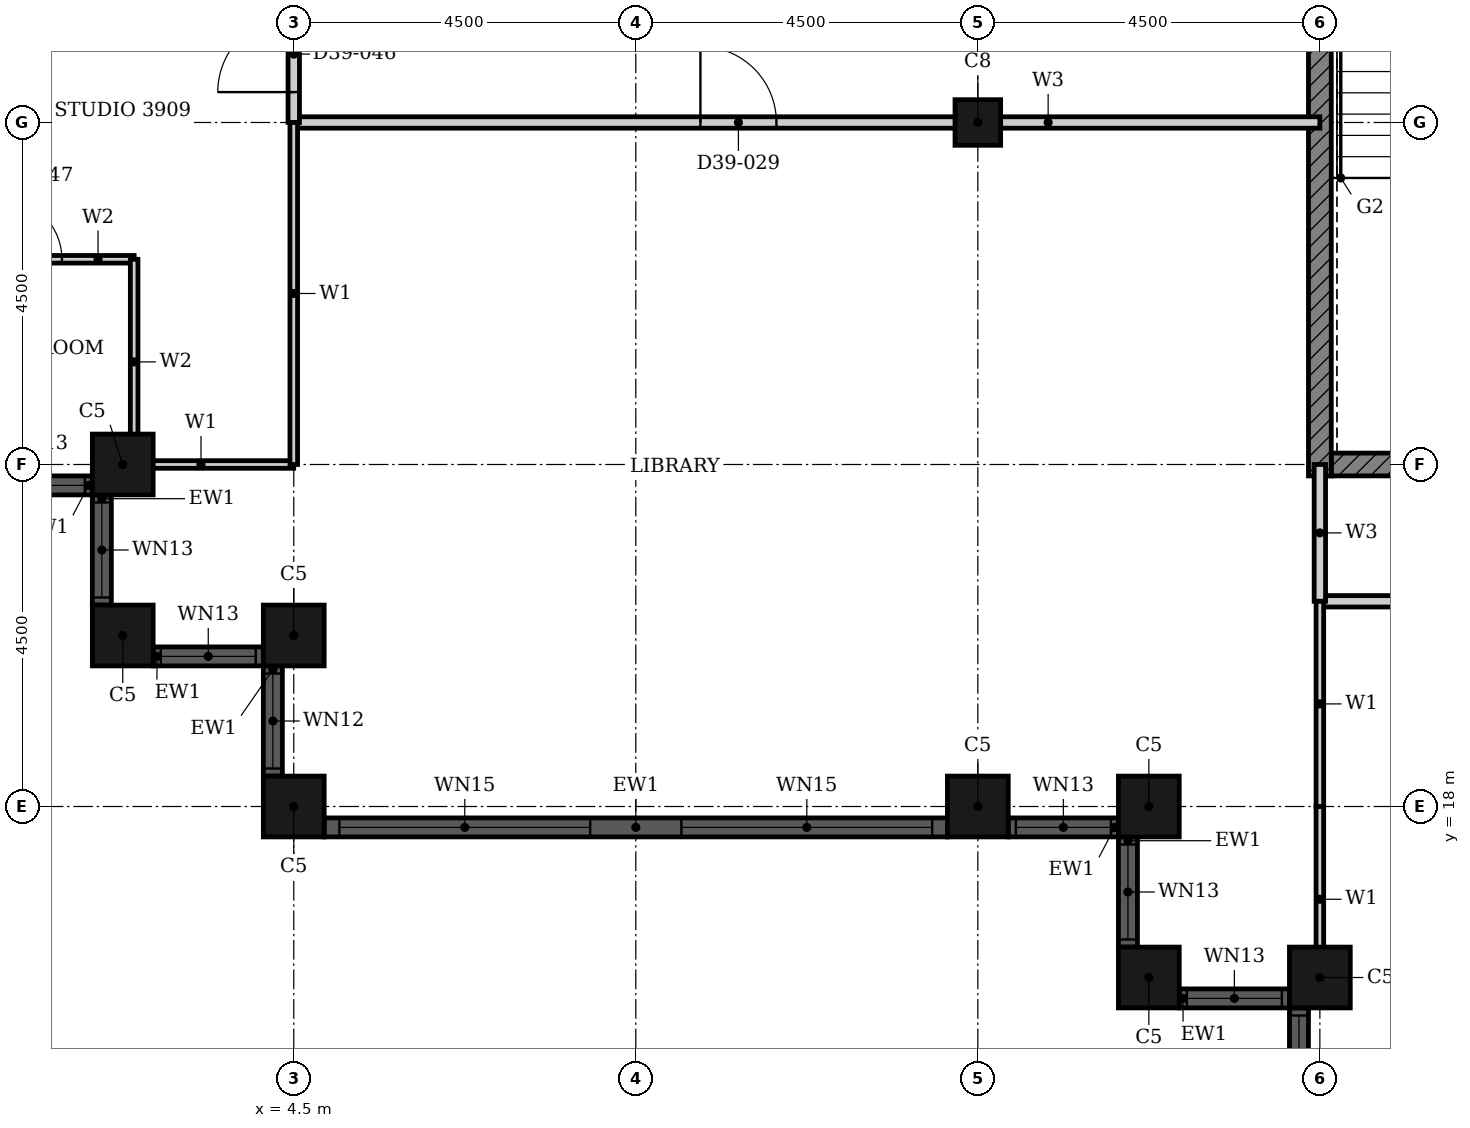
"""IFC4 building model, lengths in metres.
Left out: names, types, materials, properties, quantities, classifications, styles, units other than length and angle.
Written with IfcOpenShell. Run it as: python <this file> out.ifc"""

import sys

from ifc_helpers import new_model, si_unit, direction, frame, frame_2d, origin, origin_2d, place, context, subcontext, project, spatial, rectangle, hollow_rectangle, extrude, element, fill, save


model = new_model("IFC4")
c1 = context("Model", 3, precision=1e-05, world=origin(), true_north=direction((0.0, 1.0)))
c2 = subcontext(c1, "Body", "Model", "MODEL_VIEW")
j1 = project(units=[si_unit("LENGTHUNIT", "METRE"), si_unit("PLANEANGLEUNIT", "RADIAN")], contexts=[c1])
p1 = place(None, origin())
s1 = spatial("IfcSite", under=j1, at=p1, CompositionType="ELEMENT")
p2 = place(p1, origin())
s2 = spatial("IfcBuilding", under=s1, at=p2, CompositionType="ELEMENT")
p3 = place(p2, frame((0.0, 0.0, 158.0)))
s3 = spatial("IfcBuildingStorey", under=s2, at=p3, CompositionType="ELEMENT", Elevation=158.0)
for number, where, z_axis, x_axis in (
    (1, (2.25, 22.5, 0.0), (0.0, 0.0, 1.0), (1.0, 0.0, 0.0)),
    (2, (2.25, 20.25, 0.0), (0.0, 0.0, 1.0), (1.0, 0.0, 0.0)),
    (3, (4.5, 20.25, 0.0), (0.0, 0.0, 1.0), (1.0, 0.0, 0.0)),
    (4, (4.5, 18.0, 0.0), (0.0, 0.0, 1.0), (1.0, 0.0, 0.0)),
    (5, (13.5, 18.0, 0.0), (0.0, 0.0, 1.0), (1.0, 0.0, 0.0)),
    (6, (15.75, 18.0, 0.0), (0.0, 0.0, 1.0), (1.0, 0.0, 0.0)),
    (7, (15.75, 15.75, 0.0), (0.0, 0.0, 1.0), (1.0, 0.0, 0.0)),
    (8, (18.0, 15.75, 0.0), (0.0, 0.0, 1.0), (1.0, 0.0, 0.0)),
):
    element("IfcColumn", number, at=place(p3, frame(where, z_axis=z_axis, x_axis=x_axis)), inside=s3, PredefinedType="COLUMN", context=c2, shape_type="SweptSolid", body=[
        extrude(hollow_rectangle(XDim=0.8, YDim=0.8, WallThickness=0.025, at=origin_2d()), origin(), (0.0, 0.0, 1.0), 3.7),
    ])
p4 = place(p3, frame((13.5, 27.0, 0.0), z_axis=(0.0, 0.0, 1.0), x_axis=(1.0, 0.0, 0.0)))
e9 = element("IfcColumn", 9, at=p4, inside=s3, PredefinedType="COLUMN", context=c2, shape_type="SweptSolid", body=[
    extrude(hollow_rectangle(XDim=0.6, YDim=0.6, WallThickness=0.02, at=origin_2d()), origin(), (0.0, 0.0, 1.0), 3.7),
])
p5 = place(p3, frame((0.4, 22.225, 0.0), z_axis=(0.0, 0.0, 1.0), x_axis=(1.0, 0.0, 0.0)))
e10 = element("IfcWall", 10, at=p5, inside=s3, PredefinedType="SOLIDWALL", context=c2, shape_type="SweptSolid", body=[
    extrude(rectangle(XDim=1.45, YDim=0.25, at=frame_2d((0.725, 0.0))), origin(), (0.0, 0.0, 1.0), 3.7),
])
p6 = place(p5, frame((0.1, 0.0, 0.9)))
e11 = element("IfcOpeningElement", 11, at=p6, cuts=e10, PredefinedType="OPENING", context=c2, shape_type="SweptSolid", body=[
    extrude(rectangle(XDim=1.25, YDim=1.85, at=frame_2d((0.625, 0.925))), frame((0.0, 0.135, 0.0), z_axis=(0.0, -1.0, 0.0), x_axis=(1.0, 0.0, 0.0)), (0.0, 0.0, 1.0), 0.27),
])
p7 = place(p3, frame((1.975, 22.1, 0.0), z_axis=(0.0, 0.0, 1.0), x_axis=(0.0, -1.0, 0.0)))
e12 = element("IfcWall", 12, at=p7, inside=s3, PredefinedType="SOLIDWALL", context=c2, shape_type="SweptSolid", body=[
    extrude(rectangle(XDim=1.45, YDim=0.25, at=frame_2d((0.725, 0.0))), origin(), (0.0, 0.0, 1.0), 3.7),
])
p8 = place(p7, frame((0.1, 0.0, 0.9)))
e13 = element("IfcOpeningElement", 13, at=p8, cuts=e12, PredefinedType="OPENING", context=c2, shape_type="SweptSolid", body=[
    extrude(rectangle(XDim=1.25, YDim=1.85, at=frame_2d((0.625, 0.925))), frame((0.0, 0.135, 0.0), z_axis=(0.0, -1.0, 0.0), x_axis=(1.0, 0.0, 0.0)), (0.0, 0.0, 1.0), 0.27),
])
p9 = place(p3, frame((2.65, 19.975, 0.0), z_axis=(0.0, 0.0, 1.0), x_axis=(1.0, 0.0, 0.0)))
e14 = element("IfcWall", 14, at=p9, inside=s3, PredefinedType="SOLIDWALL", context=c2, shape_type="SweptSolid", body=[
    extrude(rectangle(XDim=1.45, YDim=0.25, at=frame_2d((0.725, 0.0))), origin(), (0.0, 0.0, 1.0), 3.7),
])
p10 = place(p9, frame((0.1, 0.0, 0.9)))
e15 = element("IfcOpeningElement", 15, at=p10, cuts=e14, PredefinedType="OPENING", context=c2, shape_type="SweptSolid", body=[
    extrude(rectangle(XDim=1.25, YDim=1.85, at=frame_2d((0.625, 0.925))), frame((0.0, 0.135, 0.0), z_axis=(0.0, -1.0, 0.0), x_axis=(1.0, 0.0, 0.0)), (0.0, 0.0, 1.0), 0.27),
])
p11 = place(p3, frame((4.225, 19.85, 0.0), z_axis=(0.0, 0.0, 1.0), x_axis=(0.0, -1.0, 0.0)))
e16 = element("IfcWall", 16, at=p11, inside=s3, PredefinedType="SOLIDWALL", context=c2, shape_type="SweptSolid", body=[
    extrude(rectangle(XDim=1.45, YDim=0.25, at=frame_2d((0.725, 0.0))), origin(), (0.0, 0.0, 1.0), 3.7),
])
p12 = place(p11, frame((0.1, 0.0, 0.9)))
e17 = element("IfcOpeningElement", 17, at=p12, cuts=e16, PredefinedType="OPENING", context=c2, shape_type="SweptSolid", body=[
    extrude(rectangle(XDim=1.25, YDim=2.08, at=frame_2d((0.625, 1.04))), frame((0.0, 0.135, 0.0), z_axis=(0.0, -1.0, 0.0), x_axis=(1.0, 0.0, 0.0)), (0.0, 0.0, 1.0), 0.27),
])
p13 = place(p3, frame((4.9, 17.725, 0.0), z_axis=(0.0, 0.0, 1.0), x_axis=(1.0, 0.0, 0.0)))
e18 = element("IfcWall", 18, at=p13, inside=s3, PredefinedType="SOLIDWALL", context=c2, shape_type="SweptSolid", body=[
    extrude(rectangle(XDim=8.2, YDim=0.25, at=frame_2d((4.1, 0.0))), origin(), (0.0, 0.0, 1.0), 3.7),
])
p14 = place(p13, frame((0.2, 0.0, 0.45)))
e19 = element("IfcOpeningElement", 19, at=p14, cuts=e18, PredefinedType="OPENING", context=c2, shape_type="SweptSolid", body=[
    extrude(rectangle(XDim=3.3, YDim=2.3, at=frame_2d((1.65, 1.15))), frame((0.0, 0.135, 0.0), z_axis=(0.0, -1.0, 0.0), x_axis=(1.0, 0.0, 0.0)), (0.0, 0.0, 1.0), 0.27),
])
p15 = place(p13, frame((4.7, 0.0, 0.45)))
e20 = element("IfcOpeningElement", 20, at=p15, cuts=e18, PredefinedType="OPENING", context=c2, shape_type="SweptSolid", body=[
    extrude(rectangle(XDim=3.3, YDim=2.3, at=frame_2d((1.65, 1.15))), frame((0.0, 0.135, 0.0), z_axis=(0.0, -1.0, 0.0), x_axis=(1.0, 0.0, 0.0)), (0.0, 0.0, 1.0), 0.27),
])
p16 = place(p3, frame((13.9, 17.725, 0.0), z_axis=(0.0, 0.0, 1.0), x_axis=(1.0, 0.0, 0.0)))
e21 = element("IfcWall", 21, at=p16, inside=s3, PredefinedType="SOLIDWALL", context=c2, shape_type="SweptSolid", body=[
    extrude(rectangle(XDim=1.45, YDim=0.25, at=frame_2d((0.725, 0.0))), origin(), (0.0, 0.0, 1.0), 3.7),
])
p17 = place(p16, frame((0.1, 0.0, 0.9)))
e22 = element("IfcOpeningElement", 22, at=p17, cuts=e21, PredefinedType="OPENING", context=c2, shape_type="SweptSolid", body=[
    extrude(rectangle(XDim=1.25, YDim=1.85, at=frame_2d((0.625, 0.925))), frame((0.0, 0.135, 0.0), z_axis=(0.0, -1.0, 0.0), x_axis=(1.0, 0.0, 0.0)), (0.0, 0.0, 1.0), 0.27),
])
p18 = place(p3, frame((15.475, 17.6, 0.0), z_axis=(0.0, 0.0, 1.0), x_axis=(0.0, -1.0, 0.0)))
e23 = element("IfcWall", 23, at=p18, inside=s3, PredefinedType="SOLIDWALL", context=c2, shape_type="SweptSolid", body=[
    extrude(rectangle(XDim=1.45, YDim=0.25, at=frame_2d((0.725, 0.0))), origin(), (0.0, 0.0, 1.0), 3.7),
])
p19 = place(p18, frame((0.1, 0.0, 0.9)))
e24 = element("IfcOpeningElement", 24, at=p19, cuts=e23, PredefinedType="OPENING", context=c2, shape_type="SweptSolid", body=[
    extrude(rectangle(XDim=1.25, YDim=1.85, at=frame_2d((0.625, 0.925))), frame((0.0, 0.135, 0.0), z_axis=(0.0, -1.0, 0.0), x_axis=(1.0, 0.0, 0.0)), (0.0, 0.0, 1.0), 0.27),
])
p20 = place(p3, frame((16.15, 15.475, 0.0), z_axis=(0.0, 0.0, 1.0), x_axis=(1.0, 0.0, 0.0)))
e25 = element("IfcWall", 25, at=p20, inside=s3, PredefinedType="SOLIDWALL", context=c2, shape_type="SweptSolid", body=[
    extrude(rectangle(XDim=1.45, YDim=0.25, at=frame_2d((0.725, 0.0))), origin(), (0.0, 0.0, 1.0), 3.7),
])
p21 = place(p20, frame((0.1, 0.0, 0.9)))
e26 = element("IfcOpeningElement", 26, at=p21, cuts=e25, PredefinedType="OPENING", context=c2, shape_type="SweptSolid", body=[
    extrude(rectangle(XDim=1.25, YDim=1.85, at=frame_2d((0.625, 0.925))), frame((0.0, 0.135, 0.0), z_axis=(0.0, -1.0, 0.0), x_axis=(1.0, 0.0, 0.0)), (0.0, 0.0, 1.0), 0.27),
])
p22 = place(p3, frame((17.725, 15.35, 0.0), z_axis=(0.0, 0.0, 1.0), x_axis=(0.0, -1.0, 0.0)))
e27 = element("IfcWall", 27, at=p22, inside=s3, PredefinedType="SOLIDWALL", context=c2, shape_type="SweptSolid", body=[
    extrude(rectangle(XDim=1.45, YDim=0.25, at=frame_2d((0.725, 0.0))), origin(), (0.0, 0.0, 1.0), 3.7),
])
p23 = place(p22, frame((0.1, 0.0, 0.9)))
e28 = element("IfcOpeningElement", 28, at=p23, cuts=e27, PredefinedType="OPENING", context=c2, shape_type="SweptSolid", body=[
    extrude(rectangle(XDim=1.25, YDim=1.85, at=frame_2d((0.625, 0.925))), frame((0.0, 0.135, 0.0), z_axis=(0.0, -1.0, 0.0), x_axis=(1.0, 0.0, 0.0)), (0.0, 0.0, 1.0), 0.27),
])
p24 = place(p3, frame((18.15, 22.5, 0.0), z_axis=(0.0, 0.0, 1.0), x_axis=(1.0, 0.0, 0.0)))
e29 = element("IfcWall", 29, at=p24, inside=s3, PredefinedType="SHEAR", context=c2, shape_type="SweptSolid", body=[
    extrude(rectangle(XDim=4.225, YDim=0.3, at=frame_2d((2.113, 0.0))), origin(), (0.0, 0.0, 1.0), 3.4),
])
p25 = place(p3, frame((18.0, 22.35, 0.0), z_axis=(0.0, 0.0, 1.0), x_axis=(0.0, 1.0, 0.0)))
e30 = element("IfcWall", 30, at=p25, inside=s3, PredefinedType="SHEAR", context=c2, shape_type="SweptSolid", body=[
    extrude(rectangle(XDim=9.3, YDim=0.3, at=frame_2d((4.65, 0.0))), origin(), (0.0, 0.0, 1.0), 3.4),
])
p26 = place(p3, frame((18.0, 20.7, 0.0), z_axis=(0.0, 0.0, 1.0), x_axis=(1.0, 0.0, 0.0)))
e31 = element("IfcWall", 31, at=p26, inside=s3, PredefinedType="PARTITIONING", context=c2, shape_type="SweptSolid", body=[
    extrude(rectangle(XDim=13.5, YDim=0.15, at=frame_2d((6.75, 0.0))), origin(), (0.0, 0.0, 1.0), 3.4),
])
p27 = place(p26, frame((6.25, 0.0, 0.0)))
e32 = element("IfcOpeningElement", 32, at=p27, cuts=e31, PredefinedType="OPENING", context=c2, shape_type="SweptSolid", body=[
    extrude(rectangle(XDim=1.0, YDim=2.1, at=frame_2d((0.5, 1.05))), frame((0.0, 0.085, 0.0), z_axis=(0.0, -1.0, 0.0), x_axis=(1.0, 0.0, 0.0)), (0.0, 0.0, 1.0), 0.17),
])
p28 = place(p3, frame((4.5, 27.0, 0.0), z_axis=(0.0, 0.0, 1.0), x_axis=(1.0, 0.0, 0.0)))
e33 = element("IfcWall", 33, at=p28, inside=s3, PredefinedType="PARTITIONING", context=c2, shape_type="SweptSolid", body=[
    extrude(rectangle(XDim=13.5, YDim=0.15, at=frame_2d((6.75, 0.0))), origin(), (0.0, 0.0, 1.0), 2.68),
])
p29 = place(p28, frame((5.35, 0.0, 0.0)))
e34 = element("IfcOpeningElement", 34, at=p29, cuts=e33, PredefinedType="OPENING", context=c2, shape_type="SweptSolid", body=[
    extrude(rectangle(XDim=1.0, YDim=2.1, at=frame_2d((0.5, 1.05))), frame((0.0, 0.085, 0.0), z_axis=(0.0, -1.0, 0.0), x_axis=(1.0, 0.0, 0.0)), (0.0, 0.0, 1.0), 0.17),
])
p30 = place(p3, frame((18.0, 20.7, 0.0), z_axis=(0.0, 0.0, 1.0), x_axis=(0.0, 1.0, 0.0)))
e35 = element("IfcWall", 35, at=p30, inside=s3, PredefinedType="PARTITIONING", context=c2, shape_type="SweptSolid", body=[
    extrude(rectangle(XDim=1.8, YDim=0.15, at=frame_2d((0.9, 0.0))), origin(), (0.0, 0.0, 1.0), 3.4),
])
p31 = place(p3, frame((4.5, 27.0, 0.0), z_axis=(0.0, 0.0, 1.0), x_axis=(0.0, 1.0, 0.0)))
e36 = element("IfcWall", 36, at=p31, inside=s3, PredefinedType="PARTITIONING", context=c2, shape_type="SweptSolid", body=[
    extrude(rectangle(XDim=1.8, YDim=0.15, at=frame_2d((0.9, 0.0))), origin(), (0.0, 0.0, 1.0), 3.4),
])
p32 = place(p31, frame((0.4, 0.0, 0.0)))
e37 = element("IfcOpeningElement", 37, at=p32, cuts=e36, PredefinedType="OPENING", context=c2, shape_type="SweptSolid", body=[
    extrude(rectangle(XDim=1.0, YDim=2.2, at=frame_2d((0.5, 1.1))), frame((0.0, 0.085, 0.0), z_axis=(0.0, -1.0, 0.0), x_axis=(1.0, 0.0, 0.0)), (0.0, 0.0, 1.0), 0.17),
])
p33 = place(p3, frame((2.06, 22.5, 0.0), z_axis=(0.0, 0.0, 1.0), x_axis=(1.0, 0.0, 0.0)))
e38 = element("IfcWall", 38, at=p33, inside=s3, PredefinedType="PARTITIONING", context=c2, shape_type="SweptSolid", body=[
    extrude(rectangle(XDim=2.439, YDim=0.1, at=frame_2d((1.219, 0.0))), origin(), (0.0, 0.0, 1.0), 2.68),
])
p34 = place(p3, frame((18.0, 15.56, 0.0), z_axis=(0.0, 0.0, 1.0), x_axis=(0.0, 1.0, 0.0)))
e39 = element("IfcWall", 39, at=p34, inside=s3, PredefinedType="PARTITIONING", context=c2, shape_type="SweptSolid", body=[
    extrude(rectangle(XDim=2.439, YDim=0.1, at=frame_2d((1.219, 0.0))), origin(), (0.0, 0.0, 1.0), 3.4),
])
p35 = place(p3, frame((18.0, 18.0, 0.0), z_axis=(0.0, 0.0, 1.0), x_axis=(0.0, 1.0, 0.0)))
e40 = element("IfcWall", 40, at=p35, inside=s3, PredefinedType="PARTITIONING", context=c2, shape_type="SweptSolid", body=[
    extrude(rectangle(XDim=2.7, YDim=0.1, at=frame_2d((1.35, 0.0))), origin(), (0.0, 0.0, 1.0), 3.4),
])
p36 = place(p3, frame((4.5, 22.5, 0.0), z_axis=(0.0, 0.0, 1.0), x_axis=(0.0, 1.0, 0.0)))
e41 = element("IfcWall", 41, at=p36, inside=s3, PredefinedType="PARTITIONING", context=c2, shape_type="SweptSolid", body=[
    extrude(rectangle(XDim=4.5, YDim=0.1, at=frame_2d((2.25, 0.0))), origin(), (0.0, 0.0, 1.0), 3.4),
])
p37 = place(p3, frame((-0.15, 25.2, 0.0), z_axis=(0.0, 0.0, 1.0), x_axis=(1.0, 0.0, 0.0)))
e42 = element("IfcWall", 42, at=p37, inside=s3, PredefinedType="PARTITIONING", context=c2, shape_type="SweptSolid", body=[
    extrude(rectangle(XDim=2.55, YDim=0.1, at=frame_2d((1.275, 0.0))), origin(), (0.0, 0.0, 1.0), 3.4),
])
p38 = place(p37, frame((0.8, 0.0, 0.0)))
e43 = element("IfcOpeningElement", 43, at=p38, cuts=e42, PredefinedType="OPENING", context=c2, shape_type="SweptSolid", body=[
    extrude(rectangle(XDim=0.8, YDim=2.1, at=frame_2d((0.4, 1.05))), frame((0.0, 0.06, 0.0), z_axis=(0.0, -1.0, 0.0), x_axis=(1.0, 0.0, 0.0)), (0.0, 0.0, 1.0), 0.12),
])
p39 = place(p3, frame((2.4, 22.5, 0.0), z_axis=(0.0, 0.0, 1.0), x_axis=(0.0, 1.0, 0.0)))
e44 = element("IfcWall", 44, at=p39, inside=s3, PredefinedType="PARTITIONING", context=c2, shape_type="SweptSolid", body=[
    extrude(rectangle(XDim=2.7, YDim=0.1, at=frame_2d((1.35, 0.0))), origin(), (0.0, 0.0, 1.0), 3.4),
])
p40 = place(p6, origin())
e45 = element("IfcWindow", 45, at=p40, inside=s3, PartitioningType="SINGLE_PANEL", PredefinedType="WINDOW", context=c2, shape_type="SweptSolid", body=[
    extrude(rectangle(XDim=1.25, YDim=1.85, at=frame_2d((0.625, 0.925))), frame((0.0, 0.03, 0.0), z_axis=(0.0, -1.0, 0.0), x_axis=(1.0, 0.0, 0.0)), (0.0, 0.0, 1.0), 0.06),
])
fill(e11, e45)
p41 = place(p8, origin())
e46 = element("IfcWindow", 46, at=p41, inside=s3, PartitioningType="SINGLE_PANEL", PredefinedType="WINDOW", context=c2, shape_type="SweptSolid", body=[
    extrude(rectangle(XDim=1.25, YDim=1.85, at=frame_2d((0.625, 0.925))), frame((0.0, 0.03, 0.0), z_axis=(0.0, -1.0, 0.0), x_axis=(1.0, 0.0, 0.0)), (0.0, 0.0, 1.0), 0.06),
])
fill(e13, e46)
p42 = place(p10, origin())
e47 = element("IfcWindow", 47, at=p42, inside=s3, PartitioningType="SINGLE_PANEL", PredefinedType="WINDOW", context=c2, shape_type="SweptSolid", body=[
    extrude(rectangle(XDim=1.25, YDim=1.85, at=frame_2d((0.625, 0.925))), frame((0.0, 0.03, 0.0), z_axis=(0.0, -1.0, 0.0), x_axis=(1.0, 0.0, 0.0)), (0.0, 0.0, 1.0), 0.06),
])
fill(e15, e47)
p43 = place(p12, origin())
e48 = element("IfcWindow", 48, at=p43, inside=s3, PartitioningType="SINGLE_PANEL", PredefinedType="WINDOW", context=c2, shape_type="SweptSolid", body=[
    extrude(rectangle(XDim=1.25, YDim=2.08, at=frame_2d((0.625, 1.04))), frame((0.0, 0.03, 0.0), z_axis=(0.0, -1.0, 0.0), x_axis=(1.0, 0.0, 0.0)), (0.0, 0.0, 1.0), 0.06),
])
fill(e17, e48)
p44 = place(p14, origin())
e49 = element("IfcWindow", 49, at=p44, inside=s3, PartitioningType="SINGLE_PANEL", PredefinedType="WINDOW", context=c2, shape_type="SweptSolid", body=[
    extrude(rectangle(XDim=3.3, YDim=2.3, at=frame_2d((1.65, 1.15))), frame((0.0, 0.03, 0.0), z_axis=(0.0, -1.0, 0.0), x_axis=(1.0, 0.0, 0.0)), (0.0, 0.0, 1.0), 0.06),
])
fill(e19, e49)
p45 = place(p15, origin())
e50 = element("IfcWindow", 50, at=p45, inside=s3, PartitioningType="SINGLE_PANEL", PredefinedType="WINDOW", context=c2, shape_type="SweptSolid", body=[
    extrude(rectangle(XDim=3.3, YDim=2.3, at=frame_2d((1.65, 1.15))), frame((0.0, 0.03, 0.0), z_axis=(0.0, -1.0, 0.0), x_axis=(1.0, 0.0, 0.0)), (0.0, 0.0, 1.0), 0.06),
])
fill(e20, e50)
p46 = place(p17, origin())
e51 = element("IfcWindow", 51, at=p46, inside=s3, PartitioningType="SINGLE_PANEL", PredefinedType="WINDOW", context=c2, shape_type="SweptSolid", body=[
    extrude(rectangle(XDim=1.25, YDim=1.85, at=frame_2d((0.625, 0.925))), frame((0.0, 0.03, 0.0), z_axis=(0.0, -1.0, 0.0), x_axis=(1.0, 0.0, 0.0)), (0.0, 0.0, 1.0), 0.06),
])
fill(e22, e51)
p47 = place(p19, origin())
e52 = element("IfcWindow", 52, at=p47, inside=s3, PartitioningType="SINGLE_PANEL", PredefinedType="WINDOW", context=c2, shape_type="SweptSolid", body=[
    extrude(rectangle(XDim=1.25, YDim=1.85, at=frame_2d((0.625, 0.925))), frame((0.0, 0.03, 0.0), z_axis=(0.0, -1.0, 0.0), x_axis=(1.0, 0.0, 0.0)), (0.0, 0.0, 1.0), 0.06),
])
fill(e24, e52)
p48 = place(p21, origin())
e53 = element("IfcWindow", 53, at=p48, inside=s3, PartitioningType="SINGLE_PANEL", PredefinedType="WINDOW", context=c2, shape_type="SweptSolid", body=[
    extrude(rectangle(XDim=1.25, YDim=1.85, at=frame_2d((0.625, 0.925))), frame((0.0, 0.03, 0.0), z_axis=(0.0, -1.0, 0.0), x_axis=(1.0, 0.0, 0.0)), (0.0, 0.0, 1.0), 0.06),
])
fill(e26, e53)
p49 = place(p23, origin())
e54 = element("IfcWindow", 54, at=p49, inside=s3, PartitioningType="SINGLE_PANEL", PredefinedType="WINDOW", context=c2, shape_type="SweptSolid", body=[
    extrude(rectangle(XDim=1.25, YDim=1.85, at=frame_2d((0.625, 0.925))), frame((0.0, 0.03, 0.0), z_axis=(0.0, -1.0, 0.0), x_axis=(1.0, 0.0, 0.0)), (0.0, 0.0, 1.0), 0.06),
])
fill(e28, e54)
p50 = place(p29, origin())
e55 = element("IfcDoor", 55, at=p50, inside=s3, OperationType="SINGLE_SWING_LEFT", PredefinedType="DOOR", context=c2, shape_type="SweptSolid", body=[
    extrude(rectangle(XDim=1.0, YDim=2.1, at=frame_2d((0.5, 1.05))), frame((0.0, 0.025, 0.0), z_axis=(0.0, -1.0, 0.0), x_axis=(1.0, 0.0, 0.0)), (0.0, 0.0, 1.0), 0.05),
])
fill(e34, e55)
p51 = place(p32, origin())
e56 = element("IfcDoor", 56, at=p51, inside=s3, OperationType="SINGLE_SWING_RIGHT", PredefinedType="DOOR", context=c2, shape_type="SweptSolid", body=[
    extrude(rectangle(XDim=1.0, YDim=2.2, at=frame_2d((0.5, 1.1))), frame((0.0, 0.025, 0.0), z_axis=(0.0, -1.0, 0.0), x_axis=(1.0, 0.0, 0.0)), (0.0, 0.0, 1.0), 0.05),
])
fill(e37, e56)
p52 = place(p38, origin())
e57 = element("IfcDoor", 57, at=p52, inside=s3, OperationType="SINGLE_SWING_RIGHT", PredefinedType="DOOR", context=c2, shape_type="SweptSolid", body=[
    extrude(rectangle(XDim=0.8, YDim=2.1, at=frame_2d((0.4, 1.05))), frame((0.0, 0.025, 0.0), z_axis=(0.0, -1.0, 0.0), x_axis=(1.0, 0.0, 0.0)), (0.0, 0.0, 1.0), 0.05),
])
fill(e43, e57)
save(model, sys.argv[1])
